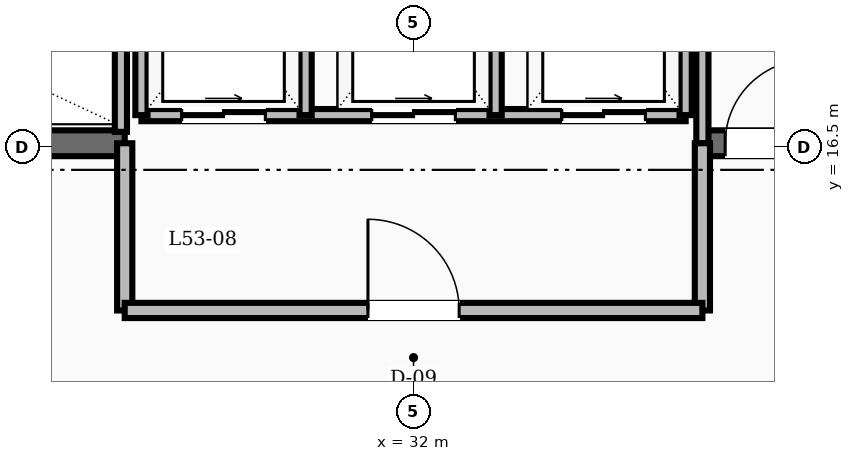
"""IFC4 building model, lengths in metres.
Left out: names, types, materials, properties, quantities, classifications, styles, units other than length and angle.
Written with IfcOpenShell. Run it as: python <this file> out.ifc"""

import sys

from ifc_helpers import new_model, si_unit, direction, frame, frame_2d, origin, place, context, subcontext, project, spatial, rectangle, extrude, element, fill, save


model = new_model("IFC4")
c1 = context("Model", 3, precision=1e-05, world=origin(), true_north=direction((0.0, 1.0)))
c2 = subcontext(c1, "Body", "Model", "MODEL_VIEW")
j1 = project(units=[si_unit("LENGTHUNIT", "METRE"), si_unit("PLANEANGLEUNIT", "RADIAN")], contexts=[c1])
p1 = place(None, origin())
s1 = spatial("IfcSite", under=j1, at=p1, CompositionType="ELEMENT")
p2 = place(p1, origin())
s2 = spatial("IfcBuilding", under=s1, at=p2, CompositionType="ELEMENT")
p3 = place(p2, frame((0.0, 0.0, 203.6)))
s3 = spatial("IfcBuildingStorey", under=s2, at=p3, CompositionType="ELEMENT", Elevation=203.6)
p4 = place(p3, frame((24.97, 16.55, 0.0), z_axis=(0.0, 0.0, 1.0), x_axis=(1.0, 0.0, 0.0)))
e1 = element("IfcWall", 1, at=p4, inside=s3, PredefinedType="SHEAR", context=c2, shape_type="SweptSolid", body=[
    extrude(rectangle(XDim=3.23, YDim=0.34, at=frame_2d((1.615, 0.0))), origin(), (0.0, 0.0, 1.0), 4.8),
])
p5 = place(p3, frame((35.8, 16.55, 0.0), z_axis=(0.0, 0.0, 1.0), x_axis=(1.0, 0.0, 0.0)))
e2 = element("IfcWall", 2, at=p5, inside=s3, PredefinedType="SHEAR", context=c2, shape_type="SweptSolid", body=[
    extrude(rectangle(XDim=3.23, YDim=0.34, at=frame_2d((1.615, 0.0))), origin(), (0.0, 0.0, 1.0), 4.8),
])
p6 = place(p5, frame((0.3, 0.0, 0.0)))
e3 = element("IfcOpeningElement", 3, at=p6, cuts=e2, PredefinedType="OPENING", context=c2, shape_type="SweptSolid", body=[
    extrude(rectangle(XDim=1.1, YDim=2.1, at=frame_2d((0.55, 1.05))), frame((0.0, 0.18, 0.0), z_axis=(0.0, -1.0, 0.0), x_axis=(1.0, 0.0, 0.0)), (0.0, 0.0, 1.0), 0.36),
])
p7 = place(p3, frame((35.8, 16.55, 0.0), z_axis=(0.0, 0.0, 1.0), x_axis=(0.0, 1.0, 0.0)))
e4 = element("IfcWall", 4, at=p7, inside=s3, PredefinedType="SOLIDWALL", context=c2, shape_type="SweptSolid", body=[
    extrude(rectangle(XDim=3.3, YDim=0.16, at=frame_2d((1.65, 0.0))), origin(), (0.0, 0.0, 1.0), 3.71),
])
for number, where, z_axis, x_axis in (
    (5, (28.2, 14.35, 0.0), (0.0, 0.0, 1.0), (0.0, 1.0, 0.0)),
    (6, (35.8, 14.35, 0.0), (0.0, 0.0, 1.0), (0.0, 1.0, 0.0)),
):
    element("IfcWall", number, at=place(p3, frame(where, z_axis=z_axis, x_axis=x_axis)), inside=s3, PredefinedType="SOLIDWALL", context=c2, shape_type="SweptSolid", body=[
        extrude(rectangle(XDim=2.2, YDim=0.2, at=frame_2d((1.1, 0.0))), origin(), (0.0, 0.0, 1.0), 3.71),
    ])
p8 = place(p3, frame((28.2, 14.35, 0.0), z_axis=(0.0, 0.0, 1.0), x_axis=(1.0, 0.0, 0.0)))
e7 = element("IfcWall", 7, at=p8, inside=s3, PredefinedType="SOLIDWALL", context=c2, shape_type="SweptSolid", body=[
    extrude(rectangle(XDim=7.6, YDim=0.2, at=frame_2d((3.8, 0.0))), origin(), (0.0, 0.0, 1.0), 3.71),
])
p9 = place(p8, frame((3.2, 0.0, 0.0)))
e8 = element("IfcOpeningElement", 8, at=p9, cuts=e7, PredefinedType="OPENING", context=c2, shape_type="SweptSolid", body=[
    extrude(rectangle(XDim=1.2, YDim=2.1, at=frame_2d((0.6, 1.05))), frame((0.0, 0.11, 0.0), z_axis=(0.0, -1.0, 0.0), x_axis=(1.0, 0.0, 0.0)), (0.0, 0.0, 1.0), 0.22),
])
p10 = place(p3, frame((28.42, 16.92, 0.0), z_axis=(0.0, 0.0, 1.0), x_axis=(1.0, 0.0, 0.0)))
e9 = element("IfcWall", 9, at=p10, inside=s3, PredefinedType="SOLIDWALL", context=c2, shape_type="SweptSolid", body=[
    extrude(rectangle(XDim=7.16, YDim=0.16, at=frame_2d((3.58, 0.0))), origin(), (0.0, 0.0, 1.0), 3.71),
])
p11 = place(p10, frame((0.53, 0.0, 0.0)))
e10 = element("IfcOpeningElement", 10, at=p11, cuts=e9, PredefinedType="OPENING", context=c2, shape_type="SweptSolid", body=[
    extrude(rectangle(XDim=1.1, YDim=2.15, at=frame_2d((0.55, 1.075))), frame((0.0, 0.09, 0.0), z_axis=(0.0, -1.0, 0.0), x_axis=(1.0, 0.0, 0.0)), (0.0, 0.0, 1.0), 0.18),
])
p12 = place(p10, frame((3.03, 0.0, 0.0)))
e11 = element("IfcOpeningElement", 11, at=p12, cuts=e9, PredefinedType="OPENING", context=c2, shape_type="SweptSolid", body=[
    extrude(rectangle(XDim=1.1, YDim=2.15, at=frame_2d((0.55, 1.075))), frame((0.0, 0.09, 0.0), z_axis=(0.0, -1.0, 0.0), x_axis=(1.0, 0.0, 0.0)), (0.0, 0.0, 1.0), 0.18),
])
p13 = place(p10, frame((5.53, 0.0, 0.0)))
e12 = element("IfcOpeningElement", 12, at=p13, cuts=e9, PredefinedType="OPENING", context=c2, shape_type="SweptSolid", body=[
    extrude(rectangle(XDim=1.1, YDim=2.15, at=frame_2d((0.55, 1.075))), frame((0.0, 0.09, 0.0), z_axis=(0.0, -1.0, 0.0), x_axis=(1.0, 0.0, 0.0)), (0.0, 0.0, 1.0), 0.18),
])
for number, where, z_axis, x_axis in (
    (13, (28.42, 16.92, 0.0), (0.0, 0.0, 1.0), (0.0, 1.0, 0.0)),
    (14, (30.58, 16.92, 0.0), (0.0, 0.0, 1.0), (0.0, 1.0, 0.0)),
    (15, (33.08, 16.92, 0.0), (0.0, 0.0, 1.0), (0.0, 1.0, 0.0)),
    (16, (35.58, 16.92, 0.0), (0.0, 0.0, 1.0), (0.0, 1.0, 0.0)),
):
    element("IfcWall", number, at=place(p3, frame(where, z_axis=z_axis, x_axis=x_axis)), inside=s3, PredefinedType="SOLIDWALL", context=c2, shape_type="SweptSolid", body=[
        extrude(rectangle(XDim=2.76, YDim=0.16, at=frame_2d((1.38, 0.0))), origin(), (0.0, 0.0, 1.0), 3.71),
    ])
p14 = place(p3, frame((28.15, 16.7, 0.0), z_axis=(0.0, 0.0, 1.0), x_axis=(0.0, 1.0, 0.0)))
e17 = element("IfcWall", 17, at=p14, inside=s3, PredefinedType="SOLIDWALL", context=c2, shape_type="SweptSolid", body=[
    extrude(rectangle(XDim=6.05, YDim=0.16, at=frame_2d((3.025, 0.0))), origin(), (0.0, 0.0, 1.0), 3.71),
])
p15 = place(p6, origin())
e18 = element("IfcDoor", 18, at=p15, inside=s3, OperationType="SINGLE_SWING_RIGHT", PredefinedType="DOOR", context=c2, shape_type="SweptSolid", body=[
    extrude(rectangle(XDim=1.1, YDim=2.1, at=frame_2d((0.55, 1.05))), frame((0.0, 0.025, 0.0), z_axis=(0.0, -1.0, 0.0), x_axis=(1.0, 0.0, 0.0)), (0.0, 0.0, 1.0), 0.05),
])
fill(e3, e18)
p16 = place(p9, origin())
e19 = element("IfcDoor", 19, at=p16, inside=s3, OperationType="SINGLE_SWING_LEFT", PredefinedType="DOOR", context=c2, shape_type="SweptSolid", body=[
    extrude(rectangle(XDim=1.2, YDim=2.1, at=frame_2d((0.6, 1.05))), frame((0.0, 0.025, 0.0), z_axis=(0.0, -1.0, 0.0), x_axis=(1.0, 0.0, 0.0)), (0.0, 0.0, 1.0), 0.05),
])
fill(e8, e19)
p17 = place(p11, origin())
e20 = element("IfcDoor", 20, at=p17, inside=s3, OperationType="SLIDING_TO_RIGHT", PredefinedType="DOOR", context=c2, shape_type="SweptSolid", body=[
    extrude(rectangle(XDim=1.1, YDim=2.15, at=frame_2d((0.55, 1.075))), frame((0.0, 0.025, 0.0), z_axis=(0.0, -1.0, 0.0), x_axis=(1.0, 0.0, 0.0)), (0.0, 0.0, 1.0), 0.05),
])
fill(e10, e20)
p18 = place(p12, origin())
e21 = element("IfcDoor", 21, at=p18, inside=s3, OperationType="SLIDING_TO_RIGHT", PredefinedType="DOOR", context=c2, shape_type="SweptSolid", body=[
    extrude(rectangle(XDim=1.1, YDim=2.15, at=frame_2d((0.55, 1.075))), frame((0.0, 0.025, 0.0), z_axis=(0.0, -1.0, 0.0), x_axis=(1.0, 0.0, 0.0)), (0.0, 0.0, 1.0), 0.05),
])
fill(e11, e21)
p19 = place(p13, origin())
e22 = element("IfcDoor", 22, at=p19, inside=s3, OperationType="SLIDING_TO_RIGHT", PredefinedType="DOOR", context=c2, shape_type="SweptSolid", body=[
    extrude(rectangle(XDim=1.1, YDim=2.15, at=frame_2d((0.55, 1.075))), frame((0.0, 0.025, 0.0), z_axis=(0.0, -1.0, 0.0), x_axis=(1.0, 0.0, 0.0)), (0.0, 0.0, 1.0), 0.05),
])
fill(e12, e22)
save(model, sys.argv[1])
